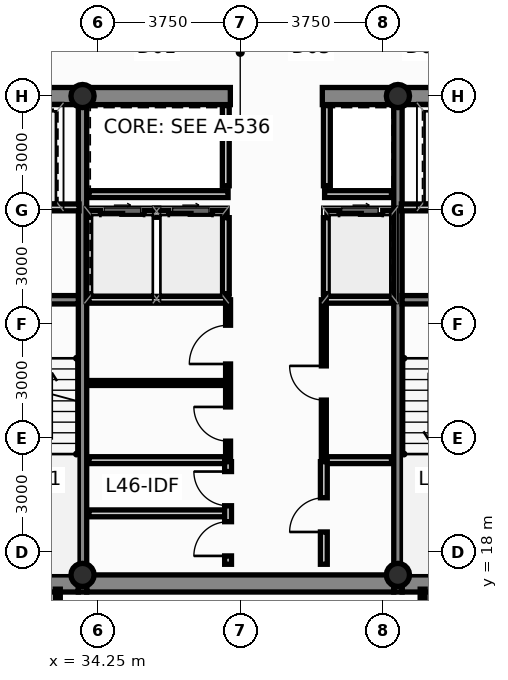
"""IFC4 building model, lengths in metres.
Left out: names, types, materials, properties, quantities, classifications, styles, units other than length and angle.
Written with IfcOpenShell. Run it as: python <this file> out.ifc"""

import sys

from ifc_helpers import new_model, si_unit, direction, frame, frame_2d, origin, origin_2d, place, context, subcontext, project, spatial, rectangle, hollow_circle, extrude, source, transform, mapped, element, fill, save


model = new_model("IFC4")
c1 = context("Model", 3, precision=1e-05, world=origin(), true_north=direction((0.0, 1.0)))
c2 = subcontext(c1, "Body", "Model", "MODEL_VIEW")
j1 = project(units=[si_unit("LENGTHUNIT", "METRE"), si_unit("PLANEANGLEUNIT", "RADIAN")], contexts=[c1])
p1 = place(None, origin())
s1 = spatial("IfcSite", under=j1, at=p1, CompositionType="ELEMENT")
p2 = place(p1, origin())
s2 = spatial("IfcBuilding", under=s1, at=p2, CompositionType="ELEMENT")
p3 = place(p2, frame((0.0, 0.0, 176.75)))
s3 = spatial("IfcBuildingStorey", under=s2, at=p3, CompositionType="ELEMENT", Elevation=176.75)
m1 = source(origin(), c2, "Body", "SweptSolid", [
    extrude(hollow_circle(Radius=0.305, WallThickness=0.025, at=origin_2d()), origin(), (0.0, 0.0, 1.0), 3.65),
])
for number, where, z_axis, x_axis in (
    (1, (33.85, 17.4, 0.0), (0.0, 0.0, 1.0), (1.0, 0.0, 0.0)),
    (2, (42.15, 17.4, 0.0), (0.0, 0.0, 1.0), (1.0, 0.0, 0.0)),
    (3, (33.85, 30.0, 0.0), (0.0, 0.0, 1.0), (1.0, 0.0, 0.0)),
    (4, (42.15, 30.0, 0.0), (0.0, 0.0, 1.0), (1.0, 0.0, 0.0)),
):
    element("IfcColumn", number, at=place(p3, frame(where, z_axis=z_axis, x_axis=x_axis)), inside=s3, PredefinedType="COLUMN", context=c2, shape_type="MappedRepresentation", body=[
        mapped(m1, transform((0.0, 0.0, 0.0), scale=1.0)),
    ])
p4 = place(p3, frame((30.84, 17.175, 0.0), z_axis=(0.0, 0.0, 1.0), x_axis=(1.0, 0.0, 0.0)))
e5 = element("IfcWall", 5, at=p4, inside=s3, PredefinedType="SHEAR", context=c2, shape_type="SweptSolid", body=[
    extrude(rectangle(XDim=2.9, YDim=0.45, at=frame_2d((1.45, 0.0))), origin(), (0.0, 0.0, 1.0), 3.65),
])
p5 = place(p3, frame((33.96, 17.175, 0.0), z_axis=(0.0, 0.0, 1.0), x_axis=(1.0, 0.0, 0.0)))
e6 = element("IfcWall", 6, at=p5, inside=s3, PredefinedType="SHEAR", context=c2, shape_type="SweptSolid", body=[
    extrude(rectangle(XDim=8.08, YDim=0.45, at=frame_2d((4.04, 0.0))), origin(), (0.0, 0.0, 1.0), 3.65),
])
for number, where, z_axis, x_axis in (
    (7, (42.26, 17.175, 0.0), (0.0, 0.0, 1.0), (1.0, 0.0, 0.0)),
    (8, (30.84, 30.0, 0.0), (0.0, 0.0, 1.0), (1.0, 0.0, 0.0)),
):
    element("IfcWall", number, at=place(p3, frame(where, z_axis=z_axis, x_axis=x_axis)), inside=s3, PredefinedType="SHEAR", context=c2, shape_type="SweptSolid", body=[
        extrude(rectangle(XDim=2.9, YDim=0.45, at=frame_2d((1.45, 0.0))), origin(), (0.0, 0.0, 1.0), 3.65),
    ])
p6 = place(p3, frame((33.96, 30.0, 0.0), z_axis=(0.0, 0.0, 1.0), x_axis=(1.0, 0.0, 0.0)))
e9 = element("IfcWall", 9, at=p6, inside=s3, PredefinedType="SHEAR", context=c2, shape_type="SweptSolid", body=[
    extrude(rectangle(XDim=3.78, YDim=0.45, at=frame_2d((1.89, 0.0))), origin(), (0.0, 0.0, 1.0), 3.65),
])
p7 = place(p3, frame((40.16, 30.0, 0.0), z_axis=(0.0, 0.0, 1.0), x_axis=(1.0, 0.0, 0.0)))
e10 = element("IfcWall", 10, at=p7, inside=s3, PredefinedType="SHEAR", context=c2, shape_type="SweptSolid", body=[
    extrude(rectangle(XDim=1.88, YDim=0.45, at=frame_2d((0.94, 0.0))), origin(), (0.0, 0.0, 1.0), 3.65),
])
p8 = place(p3, frame((42.26, 30.0, 0.0), z_axis=(0.0, 0.0, 1.0), x_axis=(1.0, 0.0, 0.0)))
e11 = element("IfcWall", 11, at=p8, inside=s3, PredefinedType="SHEAR", context=c2, shape_type="SweptSolid", body=[
    extrude(rectangle(XDim=2.9, YDim=0.45, at=frame_2d((1.45, 0.0))), origin(), (0.0, 0.0, 1.0), 3.65),
])
for number, where, z_axis, x_axis in (
    (12, (33.85, 16.95, 0.0), (0.0, 0.0, 1.0), (0.0, 1.0, 0.0)),
    (13, (42.15, 16.95, 0.0), (0.0, 0.0, 1.0), (0.0, 1.0, 0.0)),
):
    element("IfcWall", number, at=place(p3, frame(where, z_axis=z_axis, x_axis=x_axis)), inside=s3, PredefinedType="SHEAR", context=c2, shape_type="SweptSolid", body=[
        extrude(rectangle(XDim=13.275, YDim=0.22, at=frame_2d((6.638, 0.0))), origin(), (0.0, 0.0, 1.0), 3.65),
    ])
for number, where, z_axis, x_axis in (
    (14, (30.84, 24.64, 0.0), (0.0, 0.0, 1.0), (1.0, 0.0, 0.0)),
    (15, (42.26, 24.64, 0.0), (0.0, 0.0, 1.0), (1.0, 0.0, 0.0)),
):
    element("IfcWall", number, at=place(p3, frame(where, z_axis=z_axis, x_axis=x_axis)), inside=s3, PredefinedType="SHEAR", context=c2, shape_type="SweptSolid", body=[
        extrude(rectangle(XDim=2.9, YDim=0.22, at=frame_2d((1.45, 0.0))), origin(), (0.0, 0.0, 1.0), 3.65),
    ])
p9 = place(p3, frame((34.02, 26.9, 0.0), z_axis=(0.0, 0.0, 1.0), x_axis=(1.0, 0.0, 0.0)))
e16 = element("IfcWall", 16, at=p9, inside=s3, PredefinedType="PARTITIONING", context=c2, shape_type="SweptSolid", body=[
    extrude(rectangle(XDim=3.6, YDim=0.18, at=frame_2d((1.8, 0.0))), origin(), (0.0, 0.0, 1.0), 3.4),
])
p10 = place(p9, frame((0.3, 0.0, 0.0)))
e17 = element("IfcOpeningElement", 17, at=p10, cuts=e16, PredefinedType="OPENING", context=c2, shape_type="SweptSolid", body=[
    extrude(rectangle(XDim=1.15, YDim=2.2, at=frame_2d((0.575, 1.1))), frame((0.0, 0.102, 0.0), z_axis=(0.0, -1.0, 0.0), x_axis=(1.0, 0.0, 0.0)), (0.0, 0.0, 1.0), 0.204),
])
p11 = place(p9, frame((2.1, 0.0, 0.0)))
e18 = element("IfcOpeningElement", 18, at=p11, cuts=e16, PredefinedType="OPENING", context=c2, shape_type="SweptSolid", body=[
    extrude(rectangle(XDim=1.15, YDim=2.2, at=frame_2d((0.575, 1.1))), frame((0.0, 0.102, 0.0), z_axis=(0.0, -1.0, 0.0), x_axis=(1.0, 0.0, 0.0)), (0.0, 0.0, 1.0), 0.204),
])
p12 = place(p3, frame((40.28, 26.9, 0.0), z_axis=(0.0, 0.0, 1.0), x_axis=(1.0, 0.0, 0.0)))
e19 = element("IfcWall", 19, at=p12, inside=s3, PredefinedType="PARTITIONING", context=c2, shape_type="SweptSolid", body=[
    extrude(rectangle(XDim=1.7, YDim=0.18, at=frame_2d((0.85, 0.0))), origin(), (0.0, 0.0, 1.0), 3.4),
])
p13 = place(p12, frame((0.32, 0.0, 0.0)))
e20 = element("IfcOpeningElement", 20, at=p13, cuts=e19, PredefinedType="OPENING", context=c2, shape_type="SweptSolid", body=[
    extrude(rectangle(XDim=1.15, YDim=2.2, at=frame_2d((0.575, 1.1))), frame((0.0, 0.102, 0.0), z_axis=(0.0, -1.0, 0.0), x_axis=(1.0, 0.0, 0.0)), (0.0, 0.0, 1.0), 0.204),
])
for number, where, z_axis, x_axis in (
    (21, (37.62, 24.8, 0.0), (0.0, 0.0, 1.0), (0.0, 1.0, 0.0)),
    (22, (40.28, 24.8, 0.0), (0.0, 0.0, 1.0), (0.0, 1.0, 0.0)),
):
    element("IfcWall", number, at=place(p3, frame(where, z_axis=z_axis, x_axis=x_axis)), inside=s3, PredefinedType="PARTITIONING", context=c2, shape_type="SweptSolid", body=[
        extrude(rectangle(XDim=2.0, YDim=0.18, at=frame_2d((1.0, 0.0))), origin(), (0.0, 0.0, 1.0), 3.4),
    ])
p14 = place(p3, frame((34.02, 24.64, 0.0), z_axis=(0.0, 0.0, 1.0), x_axis=(1.0, 0.0, 0.0)))
e23 = element("IfcWall", 23, at=p14, inside=s3, PredefinedType="PARTITIONING", context=c2, shape_type="SweptSolid", body=[
    extrude(rectangle(XDim=3.68, YDim=0.18, at=frame_2d((1.84, 0.0))), origin(), (0.0, 0.0, 1.0), 3.4),
])
p15 = place(p3, frame((40.2, 24.64, 0.0), z_axis=(0.0, 0.0, 1.0), x_axis=(1.0, 0.0, 0.0)))
e24 = element("IfcWall", 24, at=p15, inside=s3, PredefinedType="PARTITIONING", context=c2, shape_type="SweptSolid", body=[
    extrude(rectangle(XDim=1.78, YDim=0.18, at=frame_2d((0.89, 0.0))), origin(), (0.0, 0.0, 1.0), 3.4),
])
p16 = place(p3, frame((34.02, 27.42, 0.0), z_axis=(0.0, 0.0, 1.0), x_axis=(1.0, 0.0, 0.0)))
e25 = element("IfcWall", 25, at=p16, inside=s3, PredefinedType="PARTITIONING", context=c2, shape_type="SweptSolid", body=[
    extrude(rectangle(XDim=3.66, YDim=0.18, at=frame_2d((1.83, 0.0))), origin(), (0.0, 0.0, 1.0), 3.4),
])
p17 = place(p3, frame((40.22, 27.42, 0.0), z_axis=(0.0, 0.0, 1.0), x_axis=(1.0, 0.0, 0.0)))
e26 = element("IfcWall", 26, at=p17, inside=s3, PredefinedType="PARTITIONING", context=c2, shape_type="SweptSolid", body=[
    extrude(rectangle(XDim=1.76, YDim=0.18, at=frame_2d((0.88, 0.0))), origin(), (0.0, 0.0, 1.0), 3.4),
])
for number, where, z_axis, x_axis in (
    (27, (37.62, 27.64, 0.0), (0.0, 0.0, 1.0), (0.0, 1.0, 0.0)),
    (28, (40.28, 27.64, 0.0), (0.0, 0.0, 1.0), (0.0, 1.0, 0.0)),
):
    element("IfcWall", number, at=place(p3, frame(where, z_axis=z_axis, x_axis=x_axis)), inside=s3, PredefinedType="PARTITIONING", context=c2, shape_type="SweptSolid", body=[
        extrude(rectangle(XDim=2.11, YDim=0.18, at=frame_2d((1.055, 0.0))), origin(), (0.0, 0.0, 1.0), 3.4),
    ])
for number, where, z_axis, x_axis in (
    (29, (30.86, 27.07, 0.0), (0.0, 0.0, 1.0), (1.0, 0.0, 0.0)),
    (30, (42.24, 27.07, 0.0), (0.0, 0.0, 1.0), (1.0, 0.0, 0.0)),
):
    element("IfcWall", number, at=place(p3, frame(where, z_axis=z_axis, x_axis=x_axis)), inside=s3, PredefinedType="PARTITIONING", context=c2, shape_type="SweptSolid", body=[
        extrude(rectangle(XDim=2.9, YDim=0.18, at=frame_2d((1.45, 0.0))), origin(), (0.0, 0.0, 1.0), 3.4),
    ])
p18 = place(p3, frame((34.02, 20.42, 0.0), z_axis=(0.0, 0.0, 1.0), x_axis=(1.0, 0.0, 0.0)))
e31 = element("IfcWall", 31, at=p18, inside=s3, PredefinedType="PARTITIONING", context=c2, shape_type="SweptSolid", body=[
    extrude(rectangle(XDim=3.64, YDim=0.18, at=frame_2d((1.82, 0.0))), origin(), (0.0, 0.0, 1.0), 3.4),
])
p19 = place(p3, frame((40.22, 20.42, 0.0), z_axis=(0.0, 0.0, 1.0), x_axis=(1.0, 0.0, 0.0)))
e32 = element("IfcWall", 32, at=p19, inside=s3, PredefinedType="PARTITIONING", context=c2, shape_type="SweptSolid", body=[
    extrude(rectangle(XDim=1.76, YDim=0.18, at=frame_2d((0.88, 0.0))), origin(), (0.0, 0.0, 1.0), 3.4),
])
p20 = place(p3, frame((34.02, 22.45, 0.0), z_axis=(0.0, 0.0, 1.0), x_axis=(1.0, 0.0, 0.0)))
e33 = element("IfcWall", 33, at=p20, inside=s3, PredefinedType="PARTITIONING", context=c2, shape_type="SweptSolid", body=[
    extrude(rectangle(XDim=3.58, YDim=0.13, at=frame_2d((1.79, 0.0))), origin(), (0.0, 0.0, 1.0), 3.4),
])
p21 = place(p3, frame((37.68, 20.5, 0.0), z_axis=(0.0, 0.0, 1.0), x_axis=(0.0, 1.0, 0.0)))
e34 = element("IfcWall", 34, at=p21, inside=s3, PredefinedType="PARTITIONING", context=c2, shape_type="SweptSolid", body=[
    extrude(rectangle(XDim=4.14, YDim=0.13, at=frame_2d((2.07, 0.0))), origin(), (0.0, 0.0, 1.0), 3.4),
])
p22 = place(p21, frame((0.42, 0.0, 0.0)))
e35 = element("IfcOpeningElement", 35, at=p22, cuts=e34, PredefinedType="OPENING", context=c2, shape_type="SweptSolid", body=[
    extrude(rectangle(XDim=0.9, YDim=2.1, at=frame_2d((0.45, 1.05))), frame((0.0, 0.077, 0.0), z_axis=(0.0, -1.0, 0.0), x_axis=(1.0, 0.0, 0.0)), (0.0, 0.0, 1.0), 0.154),
])
p23 = place(p21, frame((2.45, 0.0, 0.0)))
e36 = element("IfcOpeningElement", 36, at=p23, cuts=e34, PredefinedType="OPENING", context=c2, shape_type="SweptSolid", body=[
    extrude(rectangle(XDim=1.02, YDim=2.15, at=frame_2d((0.51, 1.075))), frame((0.0, 0.077, 0.0), z_axis=(0.0, -1.0, 0.0), x_axis=(1.0, 0.0, 0.0)), (0.0, 0.0, 1.0), 0.154),
])
p24 = place(p3, frame((40.2, 20.5, 0.0), z_axis=(0.0, 0.0, 1.0), x_axis=(0.0, 1.0, 0.0)))
e37 = element("IfcWall", 37, at=p24, inside=s3, PredefinedType="PARTITIONING", context=c2, shape_type="SweptSolid", body=[
    extrude(rectangle(XDim=4.14, YDim=0.13, at=frame_2d((2.07, 0.0))), origin(), (0.0, 0.0, 1.0), 3.4),
])
p25 = place(p24, frame((1.5, 0.0, 0.0)))
e38 = element("IfcOpeningElement", 38, at=p25, cuts=e37, PredefinedType="OPENING", context=c2, shape_type="SweptSolid", body=[
    extrude(rectangle(XDim=0.9, YDim=2.1, at=frame_2d((0.45, 1.05))), frame((0.0, 0.077, 0.0), z_axis=(0.0, -1.0, 0.0), x_axis=(1.0, 0.0, 0.0)), (0.0, 0.0, 1.0), 0.154),
])
p26 = place(p3, frame((34.02, 19.02, 0.0), z_axis=(0.0, 0.0, 1.0), x_axis=(1.0, 0.0, 0.0)))
e39 = element("IfcWall", 39, at=p26, inside=s3, PredefinedType="PARTITIONING", context=c2, shape_type="SweptSolid", body=[
    extrude(rectangle(XDim=3.58, YDim=0.18, at=frame_2d((1.79, 0.0))), origin(), (0.0, 0.0, 1.0), 3.4),
])
p27 = place(p3, frame((37.68, 17.68, 0.0), z_axis=(0.0, 0.0, 1.0), x_axis=(0.0, 1.0, 0.0)))
e40 = element("IfcWall", 40, at=p27, inside=s3, PredefinedType="PARTITIONING", context=c2, shape_type="SweptSolid", body=[
    extrude(rectangle(XDim=2.7, YDim=0.18, at=frame_2d((1.35, 0.0))), origin(), (0.0, 0.0, 1.0), 3.4),
])
p28 = place(p27, frame((0.22, 0.0, 0.0)))
e41 = element("IfcOpeningElement", 41, at=p28, cuts=e40, PredefinedType="OPENING", context=c2, shape_type="SweptSolid", body=[
    extrude(rectangle(XDim=0.9, YDim=2.1, at=frame_2d((0.45, 1.05))), frame((0.0, 0.102, 0.0), z_axis=(0.0, -1.0, 0.0), x_axis=(1.0, 0.0, 0.0)), (0.0, 0.0, 1.0), 0.204),
])
p29 = place(p27, frame((1.54, 0.0, 0.0)))
e42 = element("IfcOpeningElement", 42, at=p29, cuts=e40, PredefinedType="OPENING", context=c2, shape_type="SweptSolid", body=[
    extrude(rectangle(XDim=0.9, YDim=2.1, at=frame_2d((0.45, 1.05))), frame((0.0, 0.102, 0.0), z_axis=(0.0, -1.0, 0.0), x_axis=(1.0, 0.0, 0.0)), (0.0, 0.0, 1.0), 0.204),
])
p30 = place(p3, frame((40.2, 17.68, 0.0), z_axis=(0.0, 0.0, 1.0), x_axis=(0.0, 1.0, 0.0)))
e43 = element("IfcWall", 43, at=p30, inside=s3, PredefinedType="PARTITIONING", context=c2, shape_type="SweptSolid", body=[
    extrude(rectangle(XDim=2.7, YDim=0.18, at=frame_2d((1.35, 0.0))), origin(), (0.0, 0.0, 1.0), 3.4),
])
p31 = place(p30, frame((0.85, 0.0, 0.0)))
e44 = element("IfcOpeningElement", 44, at=p31, cuts=e43, PredefinedType="OPENING", context=c2, shape_type="SweptSolid", body=[
    extrude(rectangle(XDim=0.9, YDim=2.1, at=frame_2d((0.45, 1.05))), frame((0.0, 0.102, 0.0), z_axis=(0.0, -1.0, 0.0), x_axis=(1.0, 0.0, 0.0)), (0.0, 0.0, 1.0), 0.204),
])
for number, where, z_axis, x_axis in (
    (45, (33.2, 16.175, 0.0), (0.0, 0.0, 1.0), (0.0, 1.0, 0.0)),
    (46, (42.8, 16.175, 0.0), (0.0, 0.0, 1.0), (0.0, 1.0, 0.0)),
):
    element("IfcWall", number, at=place(p3, frame(where, z_axis=z_axis, x_axis=x_axis)), inside=s3, PredefinedType="PARTITIONING", context=c2, shape_type="SweptSolid", body=[
        extrude(rectangle(XDim=0.85, YDim=0.13, at=frame_2d((0.425, 0.0))), origin(), (0.0, 0.0, 1.0), 3.4),
    ])
p32 = place(p10, origin())
e47 = element("IfcDoor", 47, at=p32, inside=s3, OperationType="SLIDING_TO_LEFT", PredefinedType="DOOR", context=c2, shape_type="SweptSolid", body=[
    extrude(rectangle(XDim=1.15, YDim=2.2, at=frame_2d((0.575, 1.1))), frame((0.0, 0.025, 0.0), z_axis=(0.0, -1.0, 0.0), x_axis=(1.0, 0.0, 0.0)), (0.0, 0.0, 1.0), 0.05),
])
fill(e17, e47)
p33 = place(p11, origin())
e48 = element("IfcDoor", 48, at=p33, inside=s3, OperationType="SLIDING_TO_RIGHT", PredefinedType="DOOR", context=c2, shape_type="SweptSolid", body=[
    extrude(rectangle(XDim=1.15, YDim=2.2, at=frame_2d((0.575, 1.1))), frame((0.0, 0.025, 0.0), z_axis=(0.0, -1.0, 0.0), x_axis=(1.0, 0.0, 0.0)), (0.0, 0.0, 1.0), 0.05),
])
fill(e18, e48)
p34 = place(p13, origin())
e49 = element("IfcDoor", 49, at=p34, inside=s3, OperationType="SLIDING_TO_LEFT", PredefinedType="DOOR", context=c2, shape_type="SweptSolid", body=[
    extrude(rectangle(XDim=1.15, YDim=2.2, at=frame_2d((0.575, 1.1))), frame((0.0, 0.025, 0.0), z_axis=(0.0, -1.0, 0.0), x_axis=(1.0, 0.0, 0.0)), (0.0, 0.0, 1.0), 0.05),
])
fill(e20, e49)
p35 = place(p22, origin())
e50 = element("IfcDoor", 50, at=p35, inside=s3, OperationType="SINGLE_SWING_RIGHT", PredefinedType="DOOR", context=c2, shape_type="SweptSolid", body=[
    extrude(rectangle(XDim=0.9, YDim=2.1, at=frame_2d((0.45, 1.05))), frame((0.0, 0.025, 0.0), z_axis=(0.0, -1.0, 0.0), x_axis=(1.0, 0.0, 0.0)), (0.0, 0.0, 1.0), 0.05),
])
fill(e35, e50)
p36 = place(p23, origin())
e51 = element("IfcDoor", 51, at=p36, inside=s3, OperationType="SINGLE_SWING_LEFT", PredefinedType="DOOR", context=c2, shape_type="SweptSolid", body=[
    extrude(rectangle(XDim=1.02, YDim=2.15, at=frame_2d((0.51, 1.075))), frame((0.0, 0.025, 0.0), z_axis=(0.0, -1.0, 0.0), x_axis=(1.0, 0.0, 0.0)), (0.0, 0.0, 1.0), 0.05),
])
fill(e36, e51)
p37 = place(p25, origin())
e52 = element("IfcDoor", 52, at=p37, inside=s3, OperationType="SINGLE_SWING_RIGHT", PredefinedType="DOOR", context=c2, shape_type="SweptSolid", body=[
    extrude(rectangle(XDim=0.9, YDim=2.1, at=frame_2d((0.45, 1.05))), frame((0.0, 0.025, 0.0), z_axis=(0.0, -1.0, 0.0), x_axis=(1.0, 0.0, 0.0)), (0.0, 0.0, 1.0), 0.05),
])
fill(e38, e52)
p38 = place(p28, origin())
e53 = element("IfcDoor", 53, at=p38, inside=s3, OperationType="SINGLE_SWING_LEFT", PredefinedType="DOOR", context=c2, shape_type="SweptSolid", body=[
    extrude(rectangle(XDim=0.9, YDim=2.1, at=frame_2d((0.45, 1.05))), frame((0.0, 0.025, 0.0), z_axis=(0.0, -1.0, 0.0), x_axis=(1.0, 0.0, 0.0)), (0.0, 0.0, 1.0), 0.05),
])
fill(e41, e53)
p39 = place(p29, origin())
e54 = element("IfcDoor", 54, at=p39, inside=s3, OperationType="SINGLE_SWING_RIGHT", PredefinedType="DOOR", context=c2, shape_type="SweptSolid", body=[
    extrude(rectangle(XDim=0.9, YDim=2.1, at=frame_2d((0.45, 1.05))), frame((0.0, 0.025, 0.0), z_axis=(0.0, -1.0, 0.0), x_axis=(1.0, 0.0, 0.0)), (0.0, 0.0, 1.0), 0.05),
])
fill(e42, e54)
p40 = place(p31, origin())
e55 = element("IfcDoor", 55, at=p40, inside=s3, OperationType="SINGLE_SWING_LEFT", PredefinedType="DOOR", context=c2, shape_type="SweptSolid", body=[
    extrude(rectangle(XDim=0.9, YDim=2.1, at=frame_2d((0.45, 1.05))), frame((0.0, 0.025, 0.0), z_axis=(0.0, -1.0, 0.0), x_axis=(1.0, 0.0, 0.0)), (0.0, 0.0, 1.0), 0.05),
])
fill(e44, e55)
save(model, sys.argv[1])
